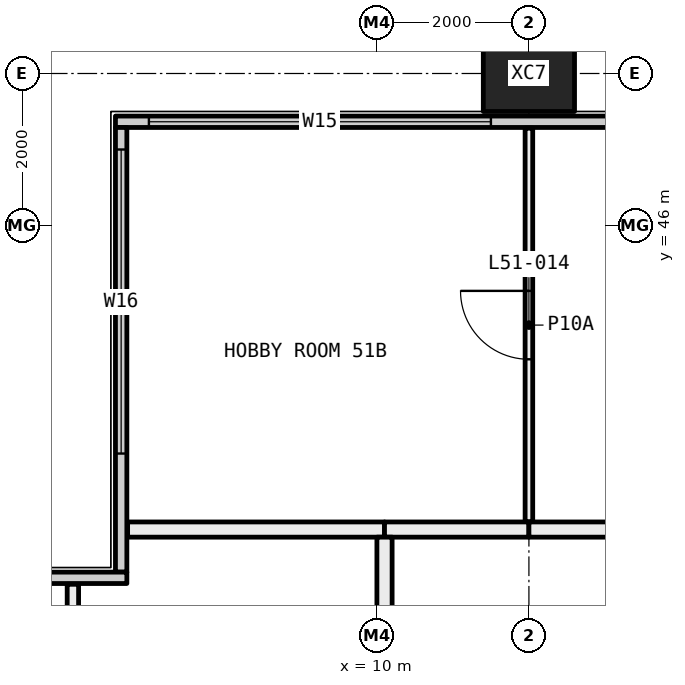
"""IFC4 building model, lengths in metres.
Left out: names, types, materials, properties, quantities, classifications, styles, units other than length and angle.
Written with IfcOpenShell. Run it as: python <this file> out.ifc"""

import sys

from ifc_helpers import new_model, si_unit, direction, frame, frame_2d, origin, origin_2d, place, context, subcontext, project, spatial, rectangle, hollow_rectangle, extrude, element, fill, save


model = new_model("IFC4")
c1 = context("Model", 3, precision=1e-05, world=origin(), true_north=direction((0.0, 1.0)))
c2 = subcontext(c1, "Body", "Model", "MODEL_VIEW")
j1 = project(units=[si_unit("LENGTHUNIT", "METRE"), si_unit("PLANEANGLEUNIT", "RADIAN")], contexts=[c1])
p1 = place(None, origin())
s1 = spatial("IfcSite", under=j1, at=p1, CompositionType="ELEMENT")
p2 = place(p1, origin())
s2 = spatial("IfcBuilding", under=s1, at=p2, CompositionType="ELEMENT")
p3 = place(p2, frame((0.0, 0.0, 192.75)))
s3 = spatial("IfcBuildingStorey", under=s2, at=p3, CompositionType="ELEMENT", Elevation=192.75)
p4 = place(p3, frame((12.0, 48.0, -0.4), z_axis=(0.0, 0.0, 1.0), x_axis=(1.0, 0.0, 0.0)))
e1 = element("IfcColumn", 1, at=p4, inside=s3, PredefinedType="COLUMN", context=c2, shape_type="SweptSolid", body=[
    extrude(hollow_rectangle(XDim=1.2, YDim=1.0, WallThickness=0.045, at=origin_2d()), origin(), (0.0, 0.0, 1.0), 3.45),
])
p5 = place(p3, frame((6.56, 47.365, 0.0), z_axis=(0.0, 0.0, 1.0), x_axis=(1.0, 0.0, 0.0)))
e2 = element("IfcWall", 2, at=p5, inside=s3, PredefinedType="ELEMENTEDWALL", context=c2, shape_type="SweptSolid", body=[
    extrude(rectangle(XDim=46.88, YDim=0.15, at=frame_2d((23.44, 0.0))), origin(), (0.0, 0.0, 1.0), 3.05),
])
p6 = place(p5, frame((0.44, 0.0, 0.45)))
e3 = element("IfcOpeningElement", 3, at=p6, cuts=e2, PredefinedType="OPENING", context=c2, shape_type="SweptSolid", body=[
    extrude(rectangle(XDim=4.5, YDim=2.55, at=frame_2d((2.25, 1.275))), frame((0.0, 0.085, 0.0), z_axis=(0.0, -1.0, 0.0), x_axis=(1.0, 0.0, 0.0)), (0.0, 0.0, 1.0), 0.17),
])
p7 = place(p5, frame((7.69, 0.0, 0.45)))
e4 = element("IfcOpeningElement", 4, at=p7, cuts=e2, PredefinedType="OPENING", context=c2, shape_type="SweptSolid", body=[
    extrude(rectangle(XDim=3.25, YDim=2.55, at=frame_2d((1.625, 1.275))), frame((0.0, 0.085, 0.0), z_axis=(0.0, -1.0, 0.0), x_axis=(1.0, 0.0, 0.0)), (0.0, 0.0, 1.0), 0.17),
])
p8 = place(p5, frame((11.94, 0.0, 0.45)))
e5 = element("IfcOpeningElement", 5, at=p8, cuts=e2, PredefinedType="OPENING", context=c2, shape_type="SweptSolid", body=[
    extrude(rectangle(XDim=3.25, YDim=2.55, at=frame_2d((1.625, 1.275))), frame((0.0, 0.085, 0.0), z_axis=(0.0, -1.0, 0.0), x_axis=(1.0, 0.0, 0.0)), (0.0, 0.0, 1.0), 0.17),
])
p9 = place(p5, frame((19.69, 0.0, 0.45)))
e6 = element("IfcOpeningElement", 6, at=p9, cuts=e2, PredefinedType="OPENING", context=c2, shape_type="SweptSolid", body=[
    extrude(rectangle(XDim=3.25, YDim=2.55, at=frame_2d((1.625, 1.275))), frame((0.0, 0.085, 0.0), z_axis=(0.0, -1.0, 0.0), x_axis=(1.0, 0.0, 0.0)), (0.0, 0.0, 1.0), 0.17),
])
p10 = place(p5, frame((23.94, 0.0, 0.45)))
e7 = element("IfcOpeningElement", 7, at=p10, cuts=e2, PredefinedType="OPENING", context=c2, shape_type="SweptSolid", body=[
    extrude(rectangle(XDim=2.0, YDim=2.55, at=frame_2d((1.0, 1.275))), frame((0.0, 0.085, 0.0), z_axis=(0.0, -1.0, 0.0), x_axis=(1.0, 0.0, 0.0)), (0.0, 0.0, 1.0), 0.17),
])
p11 = place(p5, frame((31.69, 0.0, 0.45)))
e8 = element("IfcOpeningElement", 8, at=p11, cuts=e2, PredefinedType="OPENING", context=c2, shape_type="SweptSolid", body=[
    extrude(rectangle(XDim=3.25, YDim=2.55, at=frame_2d((1.625, 1.275))), frame((0.0, 0.085, 0.0), z_axis=(0.0, -1.0, 0.0), x_axis=(1.0, 0.0, 0.0)), (0.0, 0.0, 1.0), 0.17),
])
p12 = place(p5, frame((35.94, 0.0, 0.45)))
e9 = element("IfcOpeningElement", 9, at=p12, cuts=e2, PredefinedType="OPENING", context=c2, shape_type="SweptSolid", body=[
    extrude(rectangle(XDim=3.25, YDim=2.55, at=frame_2d((1.625, 1.275))), frame((0.0, 0.085, 0.0), z_axis=(0.0, -1.0, 0.0), x_axis=(1.0, 0.0, 0.0)), (0.0, 0.0, 1.0), 0.17),
])
p13 = place(p5, frame((41.94, 0.0, 0.45)))
e10 = element("IfcOpeningElement", 10, at=p13, cuts=e2, PredefinedType="OPENING", context=c2, shape_type="SweptSolid", body=[
    extrude(rectangle(XDim=4.5, YDim=2.55, at=frame_2d((2.25, 1.275))), frame((0.0, 0.085, 0.0), z_axis=(0.0, -1.0, 0.0), x_axis=(1.0, 0.0, 0.0)), (0.0, 0.0, 1.0), 0.17),
])
p14 = place(p3, frame((6.635, 41.44, 0.0), z_axis=(0.0, 0.0, 1.0), x_axis=(0.0, 1.0, 0.0)))
e11 = element("IfcWall", 11, at=p14, inside=s3, PredefinedType="ELEMENTEDWALL", context=c2, shape_type="SweptSolid", body=[
    extrude(rectangle(XDim=5.85, YDim=0.15, at=frame_2d((2.925, 0.0))), origin(), (0.0, 0.0, 1.0), 3.05),
])
p15 = place(p14, frame((1.56, 0.0, 0.45)))
e12 = element("IfcOpeningElement", 12, at=p15, cuts=e11, PredefinedType="OPENING", context=c2, shape_type="SweptSolid", body=[
    extrude(rectangle(XDim=4.0, YDim=2.55, at=frame_2d((2.0, 1.275))), frame((0.0, 0.085, 0.0), z_axis=(0.0, -1.0, 0.0), x_axis=(1.0, 0.0, 0.0)), (0.0, 0.0, 1.0), 0.17),
])
p16 = place(p3, frame((0.56, 41.365, 0.0), z_axis=(0.0, 0.0, 1.0), x_axis=(1.0, 0.0, 0.0)))
e13 = element("IfcWall", 13, at=p16, inside=s3, PredefinedType="ELEMENTEDWALL", context=c2, shape_type="SweptSolid", body=[
    extrude(rectangle(XDim=6.15, YDim=0.15, at=frame_2d((3.075, 0.0))), origin(), (0.0, 0.0, 1.0), 3.05),
])
p17 = place(p16, frame((0.44, 0.0, 0.45)))
e14 = element("IfcOpeningElement", 14, at=p17, cuts=e13, PredefinedType="OPENING", context=c2, shape_type="SweptSolid", body=[
    extrude(rectangle(XDim=4.0, YDim=2.55, at=frame_2d((2.0, 1.275))), frame((0.0, 0.085, 0.0), z_axis=(0.0, -1.0, 0.0), x_axis=(1.0, 0.0, 0.0)), (0.0, 0.0, 1.0), 0.17),
])
p18 = place(p3, frame((12.0, 42.1, 0.0), z_axis=(0.0, 0.0, 1.0), x_axis=(0.0, 1.0, 0.0)))
e15 = element("IfcWall", 15, at=p18, inside=s3, PredefinedType="PARTITIONING", context=c2, shape_type="SweptSolid", body=[
    extrude(rectangle(XDim=5.18, YDim=0.1, at=frame_2d((2.59, 0.0))), origin(), (0.0, 0.0, 1.0), 3.05),
])
p19 = place(p18, frame((2.14, 0.0, 0.0)))
e16 = element("IfcOpeningElement", 16, at=p19, cuts=e15, PredefinedType="OPENING", context=c2, shape_type="SweptSolid", body=[
    extrude(rectangle(XDim=0.9, YDim=2.1, at=frame_2d((0.45, 1.05))), frame((0.0, 0.06, 0.0), z_axis=(0.0, -1.0, 0.0), x_axis=(1.0, 0.0, 0.0)), (0.0, 0.0, 1.0), 0.12),
])
p20 = place(p3, frame((6.72, 42.0, 0.0), z_axis=(0.0, 0.0, 1.0), x_axis=(1.0, 0.0, 0.0)))
e17 = element("IfcWall", 17, at=p20, inside=s3, PredefinedType="PARTITIONING", context=c2, shape_type="SweptSolid", body=[
    extrude(rectangle(XDim=3.38, YDim=0.2, at=frame_2d((1.69, 0.0))), origin(), (0.0, 0.0, 1.0), 3.05),
])
p21 = place(p3, frame((10.1, 42.0, 0.0), z_axis=(0.0, 0.0, 1.0), x_axis=(1.0, 0.0, 0.0)))
e18 = element("IfcWall", 18, at=p21, inside=s3, PredefinedType="PARTITIONING", context=c2, shape_type="SweptSolid", body=[
    extrude(rectangle(XDim=1.9, YDim=0.2, at=frame_2d((0.95, 0.0))), origin(), (0.0, 0.0, 1.0), 3.05),
])
p22 = place(p3, frame((12.0, 42.0, 0.0), z_axis=(0.0, 0.0, 1.0), x_axis=(1.0, 0.0, 0.0)))
e19 = element("IfcWall", 19, at=p22, inside=s3, PredefinedType="PARTITIONING", context=c2, shape_type="SweptSolid", body=[
    extrude(rectangle(XDim=6.0, YDim=0.2, at=frame_2d((3.0, 0.0))), origin(), (0.0, 0.0, 1.0), 3.05),
])
p23 = place(p22, frame((2.5, 0.0, 0.0)))
e20 = element("IfcOpeningElement", 20, at=p23, cuts=e19, PredefinedType="OPENING", context=c2, shape_type="SweptSolid", body=[
    extrude(rectangle(XDim=1.0, YDim=2.1, at=frame_2d((0.5, 1.05))), frame((0.0, 0.11, 0.0), z_axis=(0.0, -1.0, 0.0), x_axis=(1.0, 0.0, 0.0)), (0.0, 0.0, 1.0), 0.22),
])
p24 = place(p3, frame((6.0, 37.5, 0.0), z_axis=(0.0, 0.0, 1.0), x_axis=(0.0, 1.0, 0.0)))
e21 = element("IfcWall", 21, at=p24, inside=s3, PredefinedType="PARTITIONING", context=c2, shape_type="SweptSolid", body=[
    extrude(rectangle(XDim=3.78, YDim=0.15, at=frame_2d((1.89, 0.0))), origin(), (0.0, 0.0, 1.0), 3.05),
])
p25 = place(p3, frame((10.1, 37.5, 0.0), z_axis=(0.0, 0.0, 1.0), x_axis=(0.0, 1.0, 0.0)))
e22 = element("IfcWall", 22, at=p25, inside=s3, PredefinedType="PARTITIONING", context=c2, shape_type="SweptSolid", body=[
    extrude(rectangle(XDim=4.4, YDim=0.2, at=frame_2d((2.2, 0.0))), origin(), (0.0, 0.0, 1.0), 3.05),
])
p26 = place(p6, origin())
e23 = element("IfcWindow", 23, at=p26, inside=s3, PartitioningType="SINGLE_PANEL", PredefinedType="WINDOW", context=c2, shape_type="SweptSolid", body=[
    extrude(rectangle(XDim=4.5, YDim=2.55, at=frame_2d((2.25, 1.275))), frame((0.0, 0.03, 0.0), z_axis=(0.0, -1.0, 0.0), x_axis=(1.0, 0.0, 0.0)), (0.0, 0.0, 1.0), 0.06),
])
fill(e3, e23)
p27 = place(p15, origin())
e24 = element("IfcWindow", 24, at=p27, inside=s3, PartitioningType="SINGLE_PANEL", PredefinedType="WINDOW", context=c2, shape_type="SweptSolid", body=[
    extrude(rectangle(XDim=4.0, YDim=2.55, at=frame_2d((2.0, 1.275))), frame((0.0, 0.03, 0.0), z_axis=(0.0, -1.0, 0.0), x_axis=(1.0, 0.0, 0.0)), (0.0, 0.0, 1.0), 0.06),
])
fill(e12, e24)
p28 = place(p19, origin())
e25 = element("IfcDoor", 25, at=p28, inside=s3, OperationType="SINGLE_SWING_LEFT", PredefinedType="DOOR", context=c2, shape_type="SweptSolid", body=[
    extrude(rectangle(XDim=0.9, YDim=2.1, at=frame_2d((0.45, 1.05))), frame((0.0, 0.025, 0.0), z_axis=(0.0, -1.0, 0.0), x_axis=(1.0, 0.0, 0.0)), (0.0, 0.0, 1.0), 0.05),
])
fill(e16, e25)
save(model, sys.argv[1])
